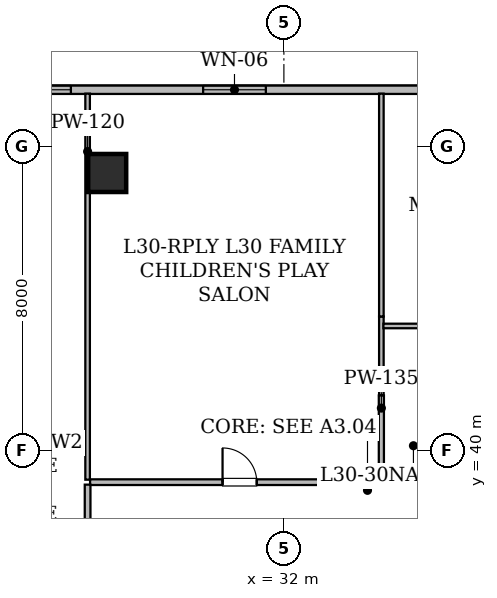
"""IFC4 building model, lengths in metres.
Left out: names, types, materials, properties, quantities, classifications, styles, units other than length and angle.
Written with IfcOpenShell. Run it as: python <this file> out.ifc"""

import sys

from ifc_helpers import new_model, si_unit, direction, frame, frame_2d, origin, origin_2d, place, context, subcontext, project, spatial, rectangle, hollow_rectangle, extrude, element, fill, save


model = new_model("IFC4")
c1 = context("Model", 3, precision=1e-05, world=origin(), true_north=direction((0.0, 1.0)))
c2 = subcontext(c1, "Body", "Model", "MODEL_VIEW")
j1 = project(units=[si_unit("LENGTHUNIT", "METRE"), si_unit("PLANEANGLEUNIT", "RADIAN")], contexts=[c1])
p1 = place(None, origin())
s1 = spatial("IfcSite", under=j1, at=p1, CompositionType="ELEMENT")
p2 = place(p1, origin())
s2 = spatial("IfcBuilding", under=s1, at=p2, CompositionType="ELEMENT")
p3 = place(p2, frame((0.0, 0.0, 120.15)))
s3 = spatial("IfcBuildingStorey", under=s2, at=p3, CompositionType="ELEMENT", Elevation=120.15)
p4 = place(p3, frame((27.35, 47.3, 0.0), z_axis=(0.0, 0.0, 1.0), x_axis=(1.0, 0.0, 0.0)))
e1 = element("IfcColumn", 1, at=p4, inside=s3, PredefinedType="COLUMN", context=c2, shape_type="SweptSolid", body=[
    extrude(hollow_rectangle(XDim=1.0, YDim=1.0, WallThickness=0.05, at=origin_2d()), origin(), (0.0, 0.0, 1.0), 3.65),
])
p5 = place(p3, frame((13.715, 49.49, 0.0), z_axis=(0.0, 0.0, 1.0), x_axis=(1.0, 0.0, 0.0)))
e2 = element("IfcWall", 2, at=p5, inside=s3, PredefinedType="STANDARD", context=c2, shape_type="SweptSolid", body=[
    extrude(rectangle(XDim=38.639, YDim=0.22, at=frame_2d((19.319, 0.0))), origin(), (0.0, 0.0, 1.0), 3.43),
])
p6 = place(p5, frame((16.16, 0.0, 0.85)))
e3 = element("IfcOpeningElement", 3, at=p6, cuts=e2, PredefinedType="OPENING", context=c2, shape_type="SweptSolid", body=[
    extrude(rectangle(XDim=1.65, YDim=1.55, at=frame_2d((0.825, 0.775))), frame((0.0, 0.12, 0.0), z_axis=(0.0, -1.0, 0.0), x_axis=(1.0, 0.0, 0.0)), (0.0, 0.0, 1.0), 0.24),
])
p7 = place(p5, frame((2.243, 0.0, 0.85)))
e4 = element("IfcOpeningElement", 4, at=p7, cuts=e2, PredefinedType="OPENING", context=c2, shape_type="SweptSolid", body=[
    extrude(rectangle(XDim=1.65, YDim=1.55, at=frame_2d((0.825, 0.775))), frame((0.0, 0.12, 0.0), z_axis=(0.0, -1.0, 0.0), x_axis=(1.0, 0.0, 0.0)), (0.0, 0.0, 1.0), 0.24),
])
p8 = place(p5, frame((11.03, 0.0, 0.85)))
e5 = element("IfcOpeningElement", 5, at=p8, cuts=e2, PredefinedType="OPENING", context=c2, shape_type="SweptSolid", body=[
    extrude(rectangle(XDim=1.65, YDim=1.55, at=frame_2d((0.825, 0.775))), frame((0.0, 0.12, 0.0), z_axis=(0.0, -1.0, 0.0), x_axis=(1.0, 0.0, 0.0)), (0.0, 0.0, 1.0), 0.24),
])
p9 = place(p5, frame((9.2, 0.0, 0.8)))
e6 = element("IfcOpeningElement", 6, at=p9, cuts=e2, PredefinedType="OPENING", context=c2, shape_type="SweptSolid", body=[
    extrude(rectangle(XDim=1.2, YDim=1.5, at=frame_2d((0.6, 0.75))), frame((0.0, 0.12, 0.0), z_axis=(0.0, -1.0, 0.0), x_axis=(1.0, 0.0, 0.0)), (0.0, 0.0, 1.0), 0.24),
])
p10 = place(p5, frame((6.175, 0.0, 0.85)))
e7 = element("IfcOpeningElement", 7, at=p10, cuts=e2, PredefinedType="OPENING", context=c2, shape_type="SweptSolid", body=[
    extrude(rectangle(XDim=1.65, YDim=1.55, at=frame_2d((0.825, 0.775))), frame((0.0, 0.12, 0.0), z_axis=(0.0, -1.0, 0.0), x_axis=(1.0, 0.0, 0.0)), (0.0, 0.0, 1.0), 0.24),
])
p11 = place(p5, frame((23.425, 0.0, 0.85)))
e8 = element("IfcOpeningElement", 8, at=p11, cuts=e2, PredefinedType="OPENING", context=c2, shape_type="SweptSolid", body=[
    extrude(rectangle(XDim=1.65, YDim=1.55, at=frame_2d((0.825, 0.775))), frame((0.0, 0.12, 0.0), z_axis=(0.0, -1.0, 0.0), x_axis=(1.0, 0.0, 0.0)), (0.0, 0.0, 1.0), 0.24),
])
p12 = place(p5, frame((30.23, 0.0, 0.85)))
e9 = element("IfcOpeningElement", 9, at=p12, cuts=e2, PredefinedType="OPENING", context=c2, shape_type="SweptSolid", body=[
    extrude(rectangle(XDim=1.65, YDim=1.55, at=frame_2d((0.825, 0.775))), frame((0.0, 0.12, 0.0), z_axis=(0.0, -1.0, 0.0), x_axis=(1.0, 0.0, 0.0)), (0.0, 0.0, 1.0), 0.24),
])
p13 = place(p5, frame((36.367, 0.0, 0.85)))
e10 = element("IfcOpeningElement", 10, at=p13, cuts=e2, PredefinedType="OPENING", context=c2, shape_type="SweptSolid", body=[
    extrude(rectangle(XDim=1.65, YDim=1.55, at=frame_2d((0.825, 0.775))), frame((0.0, 0.12, 0.0), z_axis=(0.0, -1.0, 0.0), x_axis=(1.0, 0.0, 0.0)), (0.0, 0.0, 1.0), 0.24),
])
p14 = place(p3, frame((26.9, 39.165, 0.0), z_axis=(0.0, 0.0, 1.0), x_axis=(1.0, 0.0, 0.0)))
e11 = element("IfcWall", 11, at=p14, inside=s3, PredefinedType="STANDARD", context=c2, shape_type="SweptSolid", body=[
    extrude(rectangle(XDim=7.914, YDim=0.15, at=frame_2d((3.957, 0.0))), origin(), (0.0, 0.0, 1.0), 2.647),
])
p15 = place(p14, frame((3.486, 0.0, 0.0)))
e12 = element("IfcOpeningElement", 12, at=p15, cuts=e11, PredefinedType="OPENING", context=c2, shape_type="SweptSolid", body=[
    extrude(rectangle(XDim=0.9, YDim=2.1, at=frame_2d((0.45, 1.05))), frame((0.0, 0.085, 0.0), z_axis=(0.0, -1.0, 0.0), x_axis=(1.0, 0.0, 0.0)), (0.0, 0.0, 1.0), 0.17),
])
p16 = place(p3, frame((26.835, 37.032, 0.0), z_axis=(0.0, 0.0, 1.0), x_axis=(0.0, 1.0, 0.0)))
e13 = element("IfcWall", 13, at=p16, inside=s3, PredefinedType="STANDARD", context=c2, shape_type="SweptSolid", body=[
    extrude(rectangle(XDim=2.068, YDim=0.15, at=frame_2d((1.034, 0.0))), origin(), (0.0, 0.0, 1.0), 2.647),
])
p17 = place(p3, frame((34.814, 39.165, 0.0), z_axis=(0.0, 0.0, 1.0), x_axis=(1.0, 0.0, 0.0)))
e14 = element("IfcWall", 14, at=p17, inside=s3, PredefinedType="STANDARD", context=c2, shape_type="SweptSolid", body=[
    extrude(rectangle(XDim=1.802, YDim=0.15, at=frame_2d((0.901, 0.0))), origin(), (0.0, 0.0, 1.0), 3.43),
])
p18 = place(p3, frame((26.835, 39.23, 0.0), z_axis=(0.0, 0.0, 1.0), x_axis=(0.0, 1.0, 0.0)))
e15 = element("IfcWall", 15, at=p18, inside=s3, PredefinedType="PARTITIONING", context=c2, shape_type="SweptSolid", body=[
    extrude(rectangle(XDim=10.158, YDim=0.12, at=frame_2d((5.079, 0.0))), origin(), (0.0, 0.0, 1.0), 2.876),
])
p19 = place(p3, frame((34.565, 43.524, 0.0), z_axis=(0.0, 0.0, 1.0), x_axis=(0.0, -1.0, 0.0)))
e16 = element("IfcWall", 16, at=p19, inside=s3, PredefinedType="PARTITIONING", context=c2, shape_type="SweptSolid", body=[
    extrude(rectangle(XDim=2.078, YDim=0.12, at=frame_2d((1.039, 0.0))), origin(), (0.0, 0.0, 1.0), 3.43),
])
p20 = place(p3, frame((34.565, 41.446, 0.0), z_axis=(0.0, 0.0, 1.0), x_axis=(0.0, -1.0, 0.0)))
e17 = element("IfcWall", 17, at=p20, inside=s3, PredefinedType="PARTITIONING", context=c2, shape_type="SweptSolid", body=[
    extrude(rectangle(XDim=2.214, YDim=0.135, at=frame_2d((1.107, 0.0))), origin(), (0.0, 0.0, 1.0), 3.43),
])
p21 = place(p3, frame((34.565, 49.388, 0.0), z_axis=(0.0, 0.0, 1.0), x_axis=(0.0, -1.0, 0.0)))
e18 = element("IfcWall", 18, at=p21, inside=s3, PredefinedType="PARTITIONING", context=c2, shape_type="SweptSolid", body=[
    extrude(rectangle(XDim=5.864, YDim=0.12, at=frame_2d((2.932, 0.0))), origin(), (0.0, 0.0, 1.0), 2.876),
])
p22 = place(p3, frame((36.93, 41.695, 0.0), z_axis=(0.0, 0.0, 1.0), x_axis=(-1.0, 0.0, 0.0)))
e19 = element("IfcWall", 19, at=p22, inside=s3, PredefinedType="PARTITIONING", context=c2, shape_type="SweptSolid", body=[
    extrude(rectangle(XDim=2.311, YDim=0.135, at=frame_2d((1.156, 0.0))), origin(), (0.0, 0.0, 1.0), 3.43),
])
p23 = place(p3, frame((34.619, 43.275, 0.0), z_axis=(0.0, 0.0, 1.0), x_axis=(1.0, 0.0, 0.0)))
e20 = element("IfcWall", 20, at=p23, inside=s3, PredefinedType="PARTITIONING", context=c2, shape_type="SweptSolid", body=[
    extrude(rectangle(XDim=6.681, YDim=0.12, at=frame_2d((3.341, 0.0))), origin(), (0.0, 0.0, 1.0), 2.647),
])
p24 = place(p23, frame((2.89, 0.0, 0.0)))
e21 = element("IfcOpeningElement", 21, at=p24, cuts=e20, PredefinedType="OPENING", context=c2, shape_type="SweptSolid", body=[
    extrude(rectangle(XDim=0.9, YDim=2.1, at=frame_2d((0.45, 1.05))), frame((0.0, 0.07, 0.0), z_axis=(0.0, -1.0, 0.0), x_axis=(1.0, 0.0, 0.0)), (0.0, 0.0, 1.0), 0.14),
])
p25 = place(p6, origin())
e22 = element("IfcWindow", 22, at=p25, inside=s3, PartitioningType="SINGLE_PANEL", PredefinedType="WINDOW", context=c2, shape_type="SweptSolid", body=[
    extrude(rectangle(XDim=1.65, YDim=1.55, at=frame_2d((0.825, 0.775))), frame((0.0, 0.03, 0.0), z_axis=(0.0, -1.0, 0.0), x_axis=(1.0, 0.0, 0.0)), (0.0, 0.0, 1.0), 0.06),
])
fill(e3, e22)
p26 = place(p8, origin())
e23 = element("IfcWindow", 23, at=p26, inside=s3, PartitioningType="SINGLE_PANEL", PredefinedType="WINDOW", context=c2, shape_type="SweptSolid", body=[
    extrude(rectangle(XDim=1.65, YDim=1.55, at=frame_2d((0.825, 0.775))), frame((0.0, 0.03, 0.0), z_axis=(0.0, -1.0, 0.0), x_axis=(1.0, 0.0, 0.0)), (0.0, 0.0, 1.0), 0.06),
])
fill(e5, e23)
p27 = place(p15, origin())
e24 = element("IfcDoor", 24, at=p27, inside=s3, OperationType="SINGLE_SWING_LEFT", PredefinedType="DOOR", context=c2, shape_type="SweptSolid", body=[
    extrude(rectangle(XDim=0.9, YDim=2.1, at=frame_2d((0.45, 1.05))), frame((0.0, 0.025, 0.0), z_axis=(0.0, -1.0, 0.0), x_axis=(1.0, 0.0, 0.0)), (0.0, 0.0, 1.0), 0.05),
])
fill(e12, e24)
save(model, sys.argv[1])
